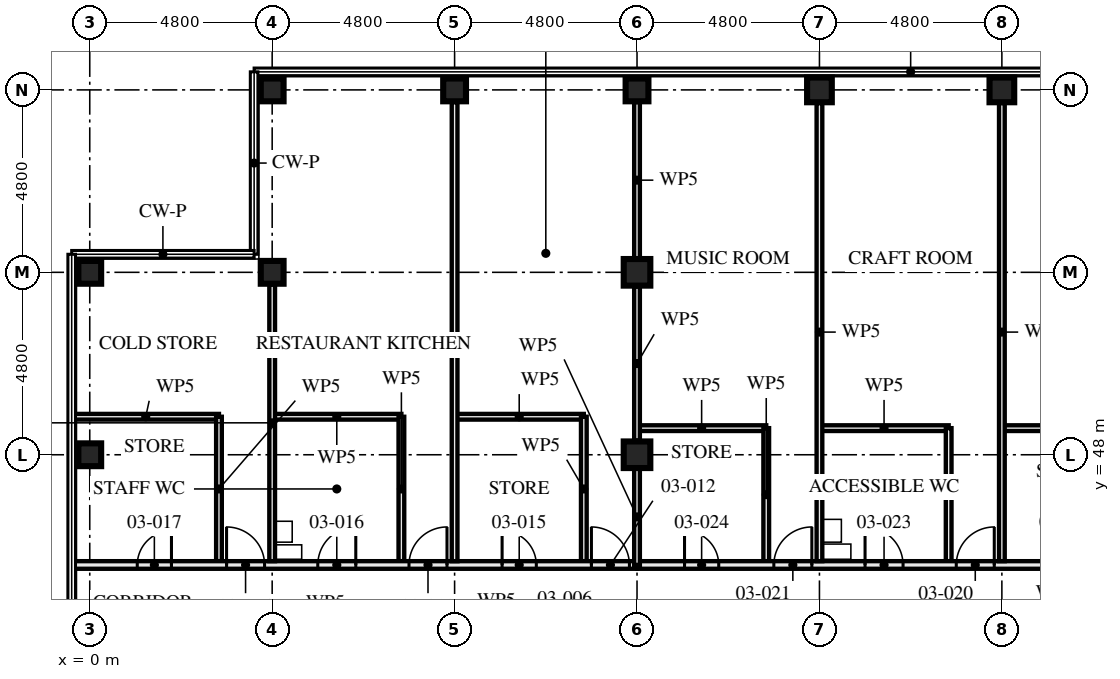
"""IFC4 building model, lengths in metres.
Left out: names, types, materials, properties, quantities, classifications, styles, units other than length and angle.
Written with IfcOpenShell. Run it as: python <this file> out.ifc"""

import sys

from ifc_helpers import new_model, si_unit, direction, frame, frame_2d, origin, origin_2d, place, context, subcontext, project, spatial, rectangle, hollow_rectangle, extrude, element, fill, save


model = new_model("IFC4")
c1 = context("Model", 3, precision=1e-05, world=origin(), true_north=direction((0.0, 1.0)))
c2 = subcontext(c1, "Body", "Model", "MODEL_VIEW")
j1 = project(units=[si_unit("LENGTHUNIT", "METRE"), si_unit("PLANEANGLEUNIT", "RADIAN")], contexts=[c1])
p1 = place(None, origin())
s1 = spatial("IfcSite", under=j1, at=p1, CompositionType="ELEMENT")
p2 = place(p1, origin())
s2 = spatial("IfcBuilding", under=s1, at=p2, CompositionType="ELEMENT")
p3 = place(p2, frame((0.0, 0.0, 13.5)))
s3 = spatial("IfcBuildingStorey", under=s2, at=p3, CompositionType="ELEMENT", Elevation=13.5)
for number, where, z_axis, x_axis in (
    (1, (0.0, 48.0, 0.0), (0.0, 0.0, 1.0), (1.0, 0.0, 0.0)),
    (2, (0.0, 52.8, 0.0), (0.0, 0.0, 1.0), (0.0, 1.0, 0.0)),
    (3, (4.8, 52.8, 0.0), (0.0, 0.0, 1.0), (0.0, 1.0, 0.0)),
    (4, (4.8, 57.6, 0.0), (0.0, 0.0, 1.0), (0.0, 1.0, 0.0)),
    (5, (9.6, 57.6, 0.0), (0.0, 0.0, 1.0), (0.0, 1.0, 0.0)),
):
    element("IfcColumn", number, at=place(p3, frame(where, z_axis=z_axis, x_axis=x_axis)), inside=s3, PredefinedType="COLUMN", context=c2, shape_type="SweptSolid", body=[
        extrude(hollow_rectangle(XDim=0.6, YDim=0.6, WallThickness=0.08, at=origin_2d()), origin(), (0.0, 0.0, 1.0), 4.5),
    ])
for number, where, z_axis, x_axis in (
    (6, (14.4, 48.0, 0.0), (0.0, 0.0, 1.0), (1.0, 0.0, 0.0)),
    (7, (14.4, 52.8, 0.0), (0.0, 0.0, 1.0), (1.0, 0.0, 0.0)),
):
    element("IfcColumn", number, at=place(p3, frame(where, z_axis=z_axis, x_axis=x_axis)), inside=s3, PredefinedType="COLUMN", context=c2, shape_type="SweptSolid", body=[
        extrude(hollow_rectangle(XDim=0.7, YDim=0.7, WallThickness=0.06, at=origin_2d()), origin(), (0.0, 0.0, 1.0), 4.5),
    ])
p4 = place(p3, frame((14.4, 57.6, 0.0), z_axis=(0.0, 0.0, 1.0), x_axis=(0.0, 1.0, 0.0)))
e8 = element("IfcColumn", 8, at=p4, inside=s3, PredefinedType="COLUMN", context=c2, shape_type="SweptSolid", body=[
    extrude(hollow_rectangle(XDim=0.6, YDim=0.6, WallThickness=0.08, at=origin_2d()), origin(), (0.0, 0.0, 1.0), 4.5),
])
for number, where, z_axis, x_axis in (
    (9, (19.2, 57.6, 0.0), (0.0, 0.0, 1.0), (0.0, 1.0, 0.0)),
    (10, (24.0, 57.6, 0.0), (0.0, 0.0, 1.0), (0.0, 1.0, 0.0)),
):
    element("IfcColumn", number, at=place(p3, frame(where, z_axis=z_axis, x_axis=x_axis)), inside=s3, PredefinedType="COLUMN", context=c2, shape_type="SweptSolid", body=[
        extrude(hollow_rectangle(XDim=0.65, YDim=0.65, WallThickness=0.08, at=origin_2d()), origin(), (0.0, 0.0, 1.0), 4.5),
    ])
p5 = place(p3, frame((13.0, 49.0, 0.0), z_axis=(0.0, 0.0, 1.0), x_axis=(0.0, -1.0, 0.0)))
e11 = element("IfcWall", 11, at=p5, inside=s3, PredefinedType="PARTITIONING", context=c2, shape_type="SweptSolid", body=[
    extrude(rectangle(XDim=3.8, YDim=0.15, at=frame_2d((1.9, 0.0))), origin(), (0.0, 0.0, 1.0), 3.55),
])
p6 = place(p3, frame((13.0, 49.0, 0.0), z_axis=(0.0, 0.0, 1.0), x_axis=(-1.0, 0.0, 0.0)))
e12 = element("IfcWall", 12, at=p6, inside=s3, PredefinedType="PARTITIONING", context=c2, shape_type="SweptSolid", body=[
    extrude(rectangle(XDim=3.4, YDim=0.15, at=frame_2d((1.7, 0.0))), origin(), (0.0, 0.0, 1.0), 4.33),
])
p7 = place(p3, frame((8.2, 49.0, 0.0), z_axis=(0.0, 0.0, 1.0), x_axis=(0.0, -1.0, 0.0)))
e13 = element("IfcWall", 13, at=p7, inside=s3, PredefinedType="PARTITIONING", context=c2, shape_type="SweptSolid", body=[
    extrude(rectangle(XDim=3.8, YDim=0.15, at=frame_2d((1.9, 0.0))), origin(), (0.0, 0.0, 1.0), 3.55),
])
p8 = place(p3, frame((8.2, 49.0, 0.0), z_axis=(0.0, 0.0, 1.0), x_axis=(-1.0, 0.0, 0.0)))
e14 = element("IfcWall", 14, at=p8, inside=s3, PredefinedType="PARTITIONING", context=c2, shape_type="SweptSolid", body=[
    extrude(rectangle(XDim=3.4, YDim=0.15, at=frame_2d((1.7, 0.0))), origin(), (0.0, 0.0, 1.0), 4.33),
])
p9 = place(p3, frame((3.4, 49.0, 0.0), z_axis=(0.0, 0.0, 1.0), x_axis=(0.0, -1.0, 0.0)))
e15 = element("IfcWall", 15, at=p9, inside=s3, PredefinedType="PARTITIONING", context=c2, shape_type="SweptSolid", body=[
    extrude(rectangle(XDim=3.8, YDim=0.15, at=frame_2d((1.9, 0.0))), origin(), (0.0, 0.0, 1.0), 3.55),
])
p10 = place(p3, frame((3.4, 49.0, 0.0), z_axis=(0.0, 0.0, 1.0), x_axis=(-1.0, 0.0, 0.0)))
e16 = element("IfcWall", 16, at=p10, inside=s3, PredefinedType="PARTITIONING", context=c2, shape_type="SweptSolid", body=[
    extrude(rectangle(XDim=3.855, YDim=0.15, at=frame_2d((1.927, 0.0))), origin(), (0.0, 0.0, 1.0), 3.32),
])
p11 = place(p3, frame((9.6, 57.28, 0.0), z_axis=(0.0, 0.0, 1.0), x_axis=(0.0, -1.0, 0.0)))
e17 = element("IfcWall", 17, at=p11, inside=s3, PredefinedType="PARTITIONING", context=c2, shape_type="SweptSolid", body=[
    extrude(rectangle(XDim=12.08, YDim=0.15, at=frame_2d((6.04, 0.0))), origin(), (0.0, 0.0, 1.0), 3.55),
])
p12 = place(p3, frame((4.8, 52.48, 0.0), z_axis=(0.0, 0.0, 1.0), x_axis=(0.0, -1.0, 0.0)))
e18 = element("IfcWall", 18, at=p12, inside=s3, PredefinedType="PARTITIONING", context=c2, shape_type="SweptSolid", body=[
    extrude(rectangle(XDim=7.28, YDim=0.15, at=frame_2d((3.64, 0.0))), origin(), (0.0, 0.0, 1.0), 3.55),
])
p13 = place(p3, frame((14.4, 45.1, 0.0), z_axis=(0.0, 0.0, 1.0), x_axis=(-1.0, 0.0, 0.0)))
e19 = element("IfcWall", 19, at=p13, inside=s3, PredefinedType="PARTITIONING", context=c2, shape_type="SweptSolid", body=[
    extrude(rectangle(XDim=14.855, YDim=0.2, at=frame_2d((7.427, 0.0))), origin(), (0.0, 0.0, 1.0), 3.32),
])
p14 = place(p13, frame((0.2, 0.0, 0.0)))
e20 = element("IfcOpeningElement", 20, at=p14, cuts=e19, PredefinedType="OPENING", context=c2, shape_type="SweptSolid", body=[
    extrude(rectangle(XDim=1.0, YDim=2.4, at=frame_2d((0.5, 1.2))), frame((0.0, 0.111, 0.0), z_axis=(0.0, -1.0, 0.0), x_axis=(1.0, 0.0, 0.0)), (0.0, 0.0, 1.0), 0.221),
])
p15 = place(p13, frame((5.0, 0.0, 0.0)))
e21 = element("IfcOpeningElement", 21, at=p15, cuts=e19, PredefinedType="OPENING", context=c2, shape_type="SweptSolid", body=[
    extrude(rectangle(XDim=1.0, YDim=2.4, at=frame_2d((0.5, 1.2))), frame((0.0, 0.111, 0.0), z_axis=(0.0, -1.0, 0.0), x_axis=(1.0, 0.0, 0.0)), (0.0, 0.0, 1.0), 0.221),
])
p16 = place(p13, frame((9.8, 0.0, 0.0)))
e22 = element("IfcOpeningElement", 22, at=p16, cuts=e19, PredefinedType="OPENING", context=c2, shape_type="SweptSolid", body=[
    extrude(rectangle(XDim=1.0, YDim=2.4, at=frame_2d((0.5, 1.2))), frame((0.0, 0.111, 0.0), z_axis=(0.0, -1.0, 0.0), x_axis=(1.0, 0.0, 0.0)), (0.0, 0.0, 1.0), 0.221),
])
p17 = place(p13, frame((2.65, 0.0, 0.0)))
e23 = element("IfcOpeningElement", 23, at=p17, cuts=e19, PredefinedType="OPENING", context=c2, shape_type="SweptSolid", body=[
    extrude(rectangle(XDim=0.9, YDim=2.1, at=frame_2d((0.45, 1.05))), frame((0.0, 0.111, 0.0), z_axis=(0.0, -1.0, 0.0), x_axis=(1.0, 0.0, 0.0)), (0.0, 0.0, 1.0), 0.221),
])
p18 = place(p13, frame((7.4, 0.0, 0.0)))
e24 = element("IfcOpeningElement", 24, at=p18, cuts=e19, PredefinedType="OPENING", context=c2, shape_type="SweptSolid", body=[
    extrude(rectangle(XDim=1.0, YDim=2.1, at=frame_2d((0.5, 1.05))), frame((0.0, 0.111, 0.0), z_axis=(0.0, -1.0, 0.0), x_axis=(1.0, 0.0, 0.0)), (0.0, 0.0, 1.0), 0.221),
])
p19 = place(p13, frame((12.25, 0.0, 0.0)))
e25 = element("IfcOpeningElement", 25, at=p19, cuts=e19, PredefinedType="OPENING", context=c2, shape_type="SweptSolid", body=[
    extrude(rectangle(XDim=0.9, YDim=2.1, at=frame_2d((0.45, 1.05))), frame((0.0, 0.111, 0.0), z_axis=(0.0, -1.0, 0.0), x_axis=(1.0, 0.0, 0.0)), (0.0, 0.0, 1.0), 0.221),
])
p20 = place(p3, frame((27.4, 48.7, 0.0), z_axis=(0.0, 0.0, 1.0), x_axis=(-1.0, 0.0, 0.0)))
e26 = element("IfcWall", 26, at=p20, inside=s3, PredefinedType="PARTITIONING", context=c2, shape_type="SweptSolid", body=[
    extrude(rectangle(XDim=3.4, YDim=0.15, at=frame_2d((1.7, 0.0))), origin(), (0.0, 0.0, 1.0), 4.33),
])
p21 = place(p3, frame((22.6, 48.7, 0.0), z_axis=(0.0, 0.0, 1.0), x_axis=(0.0, -1.0, 0.0)))
e27 = element("IfcWall", 27, at=p21, inside=s3, PredefinedType="PARTITIONING", context=c2, shape_type="SweptSolid", body=[
    extrude(rectangle(XDim=3.5, YDim=0.15, at=frame_2d((1.75, 0.0))), origin(), (0.0, 0.0, 1.0), 3.55),
])
p22 = place(p3, frame((22.6, 48.7, 0.0), z_axis=(0.0, 0.0, 1.0), x_axis=(-1.0, 0.0, 0.0)))
e28 = element("IfcWall", 28, at=p22, inside=s3, PredefinedType="PARTITIONING", context=c2, shape_type="SweptSolid", body=[
    extrude(rectangle(XDim=3.4, YDim=0.15, at=frame_2d((1.7, 0.0))), origin(), (0.0, 0.0, 1.0), 4.33),
])
p23 = place(p3, frame((17.8, 48.7, 0.0), z_axis=(0.0, 0.0, 1.0), x_axis=(0.0, -1.0, 0.0)))
e29 = element("IfcWall", 29, at=p23, inside=s3, PredefinedType="PARTITIONING", context=c2, shape_type="SweptSolid", body=[
    extrude(rectangle(XDim=3.5, YDim=0.15, at=frame_2d((1.75, 0.0))), origin(), (0.0, 0.0, 1.0), 3.55),
])
p24 = place(p3, frame((17.8, 48.7, 0.0), z_axis=(0.0, 0.0, 1.0), x_axis=(-1.0, 0.0, 0.0)))
e30 = element("IfcWall", 30, at=p24, inside=s3, PredefinedType="PARTITIONING", context=c2, shape_type="SweptSolid", body=[
    extrude(rectangle(XDim=3.4, YDim=0.15, at=frame_2d((1.7, 0.0))), origin(), (0.0, 0.0, 1.0), 4.33),
])
for number, where, z_axis, x_axis in (
    (31, (24.0, 57.255, 0.0), (0.0, 0.0, 1.0), (0.0, -1.0, 0.0)),
    (32, (19.2, 57.255, 0.0), (0.0, 0.0, 1.0), (0.0, -1.0, 0.0)),
):
    element("IfcWall", number, at=place(p3, frame(where, z_axis=z_axis, x_axis=x_axis)), inside=s3, PredefinedType="PARTITIONING", context=c2, shape_type="SweptSolid", body=[
        extrude(rectangle(XDim=12.055, YDim=0.15, at=frame_2d((6.027, 0.0))), origin(), (0.0, 0.0, 1.0), 3.55),
    ])
p25 = place(p3, frame((28.8, 45.1, 0.0), z_axis=(0.0, 0.0, 1.0), x_axis=(-1.0, 0.0, 0.0)))
e33 = element("IfcWall", 33, at=p25, inside=s3, PredefinedType="PARTITIONING", context=c2, shape_type="SweptSolid", body=[
    extrude(rectangle(XDim=14.4, YDim=0.2, at=frame_2d((7.2, 0.0))), origin(), (0.0, 0.0, 1.0), 4.33),
])
p26 = place(p25, frame((0.2, 0.0, 0.0)))
e34 = element("IfcOpeningElement", 34, at=p26, cuts=e33, PredefinedType="OPENING", context=c2, shape_type="SweptSolid", body=[
    extrude(rectangle(XDim=1.0, YDim=2.4, at=frame_2d((0.5, 1.2))), frame((0.0, 0.111, 0.0), z_axis=(0.0, -1.0, 0.0), x_axis=(1.0, 0.0, 0.0)), (0.0, 0.0, 1.0), 0.221),
])
p27 = place(p25, frame((5.0, 0.0, 0.0)))
e35 = element("IfcOpeningElement", 35, at=p27, cuts=e33, PredefinedType="OPENING", context=c2, shape_type="SweptSolid", body=[
    extrude(rectangle(XDim=1.0, YDim=2.4, at=frame_2d((0.5, 1.2))), frame((0.0, 0.111, 0.0), z_axis=(0.0, -1.0, 0.0), x_axis=(1.0, 0.0, 0.0)), (0.0, 0.0, 1.0), 0.221),
])
p28 = place(p25, frame((9.8, 0.0, 0.0)))
e36 = element("IfcOpeningElement", 36, at=p28, cuts=e33, PredefinedType="OPENING", context=c2, shape_type="SweptSolid", body=[
    extrude(rectangle(XDim=1.0, YDim=2.4, at=frame_2d((0.5, 1.2))), frame((0.0, 0.111, 0.0), z_axis=(0.0, -1.0, 0.0), x_axis=(1.0, 0.0, 0.0)), (0.0, 0.0, 1.0), 0.221),
])
p29 = place(p25, frame((2.65, 0.0, 0.0)))
e37 = element("IfcOpeningElement", 37, at=p29, cuts=e33, PredefinedType="OPENING", context=c2, shape_type="SweptSolid", body=[
    extrude(rectangle(XDim=0.9, YDim=2.1, at=frame_2d((0.45, 1.05))), frame((0.0, 0.111, 0.0), z_axis=(0.0, -1.0, 0.0), x_axis=(1.0, 0.0, 0.0)), (0.0, 0.0, 1.0), 0.221),
])
p30 = place(p25, frame((7.4, 0.0, 0.0)))
e38 = element("IfcOpeningElement", 38, at=p30, cuts=e33, PredefinedType="OPENING", context=c2, shape_type="SweptSolid", body=[
    extrude(rectangle(XDim=1.0, YDim=2.1, at=frame_2d((0.5, 1.05))), frame((0.0, 0.111, 0.0), z_axis=(0.0, -1.0, 0.0), x_axis=(1.0, 0.0, 0.0)), (0.0, 0.0, 1.0), 0.221),
])
p31 = place(p25, frame((12.25, 0.0, 0.0)))
e39 = element("IfcOpeningElement", 39, at=p31, cuts=e33, PredefinedType="OPENING", context=c2, shape_type="SweptSolid", body=[
    extrude(rectangle(XDim=0.9, YDim=2.1, at=frame_2d((0.45, 1.05))), frame((0.0, 0.111, 0.0), z_axis=(0.0, -1.0, 0.0), x_axis=(1.0, 0.0, 0.0)), (0.0, 0.0, 1.0), 0.221),
])
p32 = place(p3, frame((14.4, 45.1, 0.0), z_axis=(0.0, 0.0, 1.0), x_axis=(0.0, 1.0, 0.0)))
e40 = element("IfcWall", 40, at=p32, inside=s3, PredefinedType="PARTITIONING", context=c2, shape_type="SweptSolid", body=[
    extrude(rectangle(XDim=2.53, YDim=0.15, at=frame_2d((1.265, 0.0))), origin(), (0.0, 0.0, 1.0), 3.32),
])
p33 = place(p3, frame((14.4, 48.37, 0.0), z_axis=(0.0, 0.0, 1.0), x_axis=(0.0, 1.0, 0.0)))
e41 = element("IfcWall", 41, at=p33, inside=s3, PredefinedType="PARTITIONING", context=c2, shape_type="SweptSolid", body=[
    extrude(rectangle(XDim=4.06, YDim=0.15, at=frame_2d((2.03, 0.0))), origin(), (0.0, 0.0, 1.0), 3.32),
])
p34 = place(p3, frame((14.4, 53.17, 0.0), z_axis=(0.0, 0.0, 1.0), x_axis=(0.0, 1.0, 0.0)))
e42 = element("IfcWall", 42, at=p34, inside=s3, PredefinedType="PARTITIONING", context=c2, shape_type="SweptSolid", body=[
    extrude(rectangle(XDim=4.11, YDim=0.15, at=frame_2d((2.055, 0.0))), origin(), (0.0, 0.0, 1.0), 3.32),
])
p35 = place(p14, frame((1.0, 0.0, 0.0), z_axis=(0.0, 0.0, 1.0), x_axis=(-1.0, 0.0, 0.0)))
e43 = element("IfcDoor", 43, at=p35, inside=s3, OperationType="SINGLE_SWING_RIGHT", PredefinedType="DOOR", context=c2, shape_type="SweptSolid", body=[
    extrude(rectangle(XDim=1.0, YDim=2.4, at=frame_2d((0.5, 1.2))), frame((0.0, 0.027, 0.0), z_axis=(0.0, -1.0, 0.0), x_axis=(1.0, 0.0, 0.0)), (0.0, 0.0, 1.0), 0.054),
])
fill(e20, e43)
p36 = place(p15, frame((1.0, 0.0, 0.0), z_axis=(0.0, 0.0, 1.0), x_axis=(-1.0, 0.0, 0.0)))
e44 = element("IfcDoor", 44, at=p36, inside=s3, OperationType="SINGLE_SWING_LEFT", PredefinedType="DOOR", context=c2, shape_type="SweptSolid", body=[
    extrude(rectangle(XDim=1.0, YDim=2.4, at=frame_2d((0.5, 1.2))), frame((0.0, 0.027, 0.0), z_axis=(0.0, -1.0, 0.0), x_axis=(1.0, 0.0, 0.0)), (0.0, 0.0, 1.0), 0.054),
])
fill(e21, e44)
p37 = place(p16, frame((1.0, 0.0, 0.0), z_axis=(0.0, 0.0, 1.0), x_axis=(-1.0, 0.0, 0.0)))
e45 = element("IfcDoor", 45, at=p37, inside=s3, OperationType="SINGLE_SWING_RIGHT", PredefinedType="DOOR", context=c2, shape_type="SweptSolid", body=[
    extrude(rectangle(XDim=1.0, YDim=2.4, at=frame_2d((0.5, 1.2))), frame((0.0, 0.027, 0.0), z_axis=(0.0, -1.0, 0.0), x_axis=(1.0, 0.0, 0.0)), (0.0, 0.0, 1.0), 0.054),
])
fill(e22, e45)
p38 = place(p17, frame((0.9, 0.0, 0.0), z_axis=(0.0, 0.0, 1.0), x_axis=(-1.0, 0.0, 0.0)))
e46 = element("IfcDoor", 46, at=p38, inside=s3, OperationType="SINGLE_SWING_RIGHT", PredefinedType="DOOR", context=c2, shape_type="SweptSolid", body=[
    extrude(rectangle(XDim=0.9, YDim=2.1, at=frame_2d((0.45, 1.05))), frame((0.0, 0.027, 0.0), z_axis=(0.0, -1.0, 0.0), x_axis=(1.0, 0.0, 0.0)), (0.0, 0.0, 1.0), 0.054),
])
fill(e23, e46)
p39 = place(p18, frame((1.0, 0.0, 0.0), z_axis=(0.0, 0.0, 1.0), x_axis=(-1.0, 0.0, 0.0)))
e47 = element("IfcDoor", 47, at=p39, inside=s3, OperationType="SINGLE_SWING_LEFT", PredefinedType="DOOR", context=c2, shape_type="SweptSolid", body=[
    extrude(rectangle(XDim=1.0, YDim=2.1, at=frame_2d((0.5, 1.05))), frame((0.0, 0.027, 0.0), z_axis=(0.0, -1.0, 0.0), x_axis=(1.0, 0.0, 0.0)), (0.0, 0.0, 1.0), 0.054),
])
fill(e24, e47)
p40 = place(p19, frame((0.9, 0.0, 0.0), z_axis=(0.0, 0.0, 1.0), x_axis=(-1.0, 0.0, 0.0)))
e48 = element("IfcDoor", 48, at=p40, inside=s3, OperationType="SINGLE_SWING_LEFT", PredefinedType="DOOR", context=c2, shape_type="SweptSolid", body=[
    extrude(rectangle(XDim=0.9, YDim=2.1, at=frame_2d((0.45, 1.05))), frame((0.0, 0.027, 0.0), z_axis=(0.0, -1.0, 0.0), x_axis=(1.0, 0.0, 0.0)), (0.0, 0.0, 1.0), 0.054),
])
fill(e25, e48)
p41 = place(p27, frame((1.0, 0.0, 0.0), z_axis=(0.0, 0.0, 1.0), x_axis=(-1.0, 0.0, 0.0)))
e49 = element("IfcDoor", 49, at=p41, inside=s3, OperationType="SINGLE_SWING_LEFT", PredefinedType="DOOR", context=c2, shape_type="SweptSolid", body=[
    extrude(rectangle(XDim=1.0, YDim=2.4, at=frame_2d((0.5, 1.2))), frame((0.0, 0.027, 0.0), z_axis=(0.0, -1.0, 0.0), x_axis=(1.0, 0.0, 0.0)), (0.0, 0.0, 1.0), 0.054),
])
fill(e35, e49)
p42 = place(p28, frame((1.0, 0.0, 0.0), z_axis=(0.0, 0.0, 1.0), x_axis=(-1.0, 0.0, 0.0)))
e50 = element("IfcDoor", 50, at=p42, inside=s3, OperationType="SINGLE_SWING_LEFT", PredefinedType="DOOR", context=c2, shape_type="SweptSolid", body=[
    extrude(rectangle(XDim=1.0, YDim=2.4, at=frame_2d((0.5, 1.2))), frame((0.0, 0.027, 0.0), z_axis=(0.0, -1.0, 0.0), x_axis=(1.0, 0.0, 0.0)), (0.0, 0.0, 1.0), 0.054),
])
fill(e36, e50)
p43 = place(p30, frame((1.0, 0.0, 0.0), z_axis=(0.0, 0.0, 1.0), x_axis=(-1.0, 0.0, 0.0)))
e51 = element("IfcDoor", 51, at=p43, inside=s3, OperationType="SINGLE_SWING_RIGHT", PredefinedType="DOOR", context=c2, shape_type="SweptSolid", body=[
    extrude(rectangle(XDim=1.0, YDim=2.1, at=frame_2d((0.5, 1.05))), frame((0.0, 0.027, 0.0), z_axis=(0.0, -1.0, 0.0), x_axis=(1.0, 0.0, 0.0)), (0.0, 0.0, 1.0), 0.054),
])
fill(e38, e51)
p44 = place(p31, frame((0.9, 0.0, 0.0), z_axis=(0.0, 0.0, 1.0), x_axis=(-1.0, 0.0, 0.0)))
e52 = element("IfcDoor", 52, at=p44, inside=s3, OperationType="SINGLE_SWING_RIGHT", PredefinedType="DOOR", context=c2, shape_type="SweptSolid", body=[
    extrude(rectangle(XDim=0.9, YDim=2.1, at=frame_2d((0.45, 1.05))), frame((0.0, 0.027, 0.0), z_axis=(0.0, -1.0, 0.0), x_axis=(1.0, 0.0, 0.0)), (0.0, 0.0, 1.0), 0.054),
])
fill(e39, e52)
save(model, sys.argv[1])
